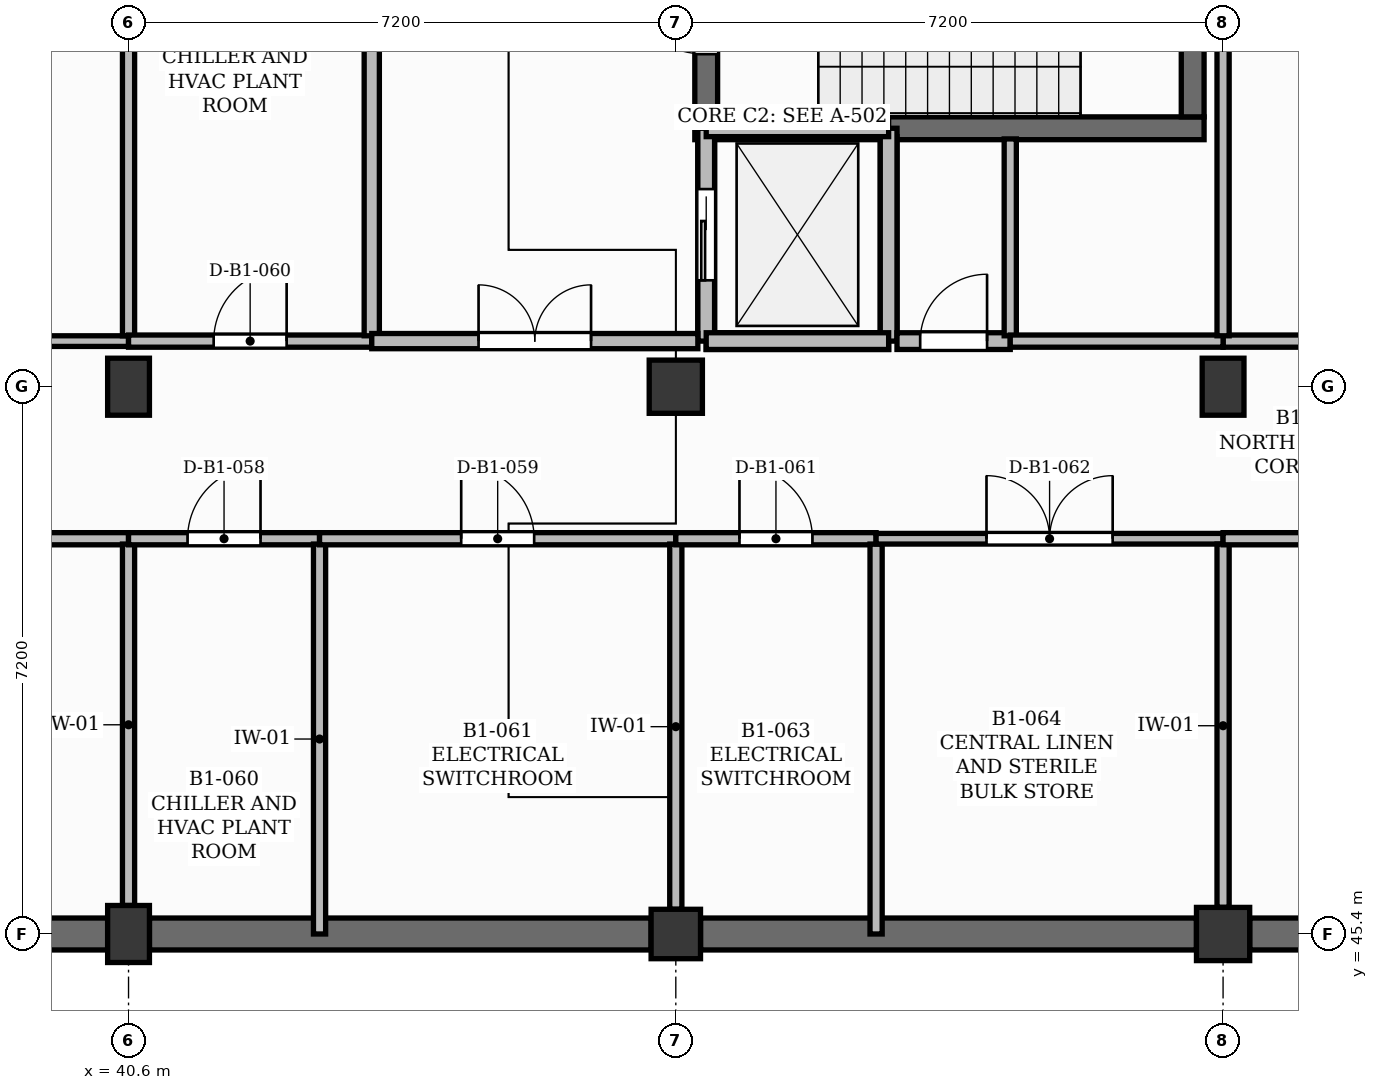
"""IFC4 building model, lengths in metres.
Left out: names, types, materials, properties, quantities, classifications, styles, units other than length and angle.
Written with IfcOpenShell. Run it as: python <this file> out.ifc"""

import sys

from ifc_helpers import new_model, si_unit, direction, frame, frame_2d, origin, origin_2d, place, context, subcontext, project, spatial, rectangle, extrude, element, fill, save


model = new_model("IFC4")
c1 = context("Model", 3, precision=1e-05, world=origin(), true_north=direction((0.0, 1.0)))
c2 = subcontext(c1, "Body", "Model", "MODEL_VIEW")
j1 = project(units=[si_unit("LENGTHUNIT", "METRE"), si_unit("PLANEANGLEUNIT", "RADIAN")], contexts=[c1])
p1 = place(None, origin())
s1 = spatial("IfcSite", under=j1, at=p1, CompositionType="ELEMENT")
p2 = place(p1, origin())
s2 = spatial("IfcBuilding", under=s1, at=p2, CompositionType="ELEMENT")
p3 = place(p2, frame((0.0, 0.0, -4.5)))
s3 = spatial("IfcBuildingStorey", under=s2, at=p3, CompositionType="ELEMENT", Elevation=-4.5)
for number, where, z_axis, x_axis in (
    (1, (40.6, 45.4, 0.0), (0.0, 0.0, 1.0), (1.0, 0.0, 0.0)),
    (2, (40.6, 52.6, 0.0), (0.0, 0.0, 1.0), (1.0, 0.0, 0.0)),
):
    element("IfcColumn", number, at=place(p3, frame(where, z_axis=z_axis, x_axis=x_axis)), inside=s3, PredefinedType="COLUMN", context=c2, shape_type="SweptSolid", body=[
        extrude(rectangle(XDim=0.55, YDim=0.75, at=origin_2d()), origin(), (0.0, 0.0, 1.0), 4.2),
    ])
p4 = place(p3, frame((47.8, 45.4, 0.0), z_axis=(0.0, 0.0, 1.0), x_axis=(1.0, 0.0, 0.0)))
e3 = element("IfcColumn", 3, at=p4, inside=s3, PredefinedType="COLUMN", context=c2, shape_type="SweptSolid", body=[
    extrude(rectangle(XDim=0.65, YDim=0.65, at=origin_2d()), origin(), (0.0, 0.0, 1.0), 4.2),
])
for number, where, z_axis, x_axis in (
    (4, (47.8, 52.6, 0.0), (0.0, 0.0, 1.0), (1.0, 0.0, 0.0)),
    (5, (55.0, 45.4, 0.0), (0.0, 0.0, 1.0), (1.0, 0.0, 0.0)),
):
    element("IfcColumn", number, at=place(p3, frame(where, z_axis=z_axis, x_axis=x_axis)), inside=s3, PredefinedType="COLUMN", context=c2, shape_type="SweptSolid", body=[
        extrude(rectangle(XDim=0.7, YDim=0.7, at=origin_2d()), origin(), (0.0, 0.0, 1.0), 4.2),
    ])
p5 = place(p3, frame((55.0, 52.6, 0.0), z_axis=(0.0, 0.0, 1.0), x_axis=(1.0, 0.0, 0.0)))
e6 = element("IfcColumn", 6, at=p5, inside=s3, PredefinedType="COLUMN", context=c2, shape_type="SweptSolid", body=[
    extrude(rectangle(XDim=0.55, YDim=0.75, at=origin_2d()), origin(), (0.0, 0.0, 1.0), 4.2),
])
p6 = place(p3, frame((33.75, 45.4, 0.0), z_axis=(0.0, 0.0, 1.0), x_axis=(1.0, 0.0, 0.0)))
e7 = element("IfcWall", 7, at=p6, inside=s3, PredefinedType="USERDEFINED", context=c2, shape_type="SweptSolid", body=[
    extrude(rectangle(XDim=6.575, YDim=0.42, at=frame_2d((3.288, 0.0))), origin(), (0.0, 0.0, 1.0), 4.2),
])
p7 = place(p3, frame((40.875, 45.4, 0.0), z_axis=(0.0, 0.0, 1.0), x_axis=(1.0, 0.0, 0.0)))
e8 = element("IfcWall", 8, at=p7, inside=s3, PredefinedType="USERDEFINED", context=c2, shape_type="SweptSolid", body=[
    extrude(rectangle(XDim=6.6, YDim=0.42, at=frame_2d((3.3, 0.0))), origin(), (0.0, 0.0, 1.0), 4.2),
])
for number, where, z_axis, x_axis in (
    (9, (48.125, 45.4, 0.0), (0.0, 0.0, 1.0), (1.0, 0.0, 0.0)),
    (10, (55.35, 45.4, 0.0), (0.0, 0.0, 1.0), (1.0, 0.0, 0.0)),
):
    element("IfcWall", number, at=place(p3, frame(where, z_axis=z_axis, x_axis=x_axis)), inside=s3, PredefinedType="USERDEFINED", context=c2, shape_type="SweptSolid", body=[
        extrude(rectangle(XDim=6.525, YDim=0.42, at=frame_2d((3.262, 0.0))), origin(), (0.0, 0.0, 1.0), 4.2),
    ])
p8 = place(p3, frame((48.05, 56.0, 0.0), z_axis=(0.0, 0.0, 1.0), x_axis=(1.0, 0.0, 0.0)))
e11 = element("IfcWall", 11, at=p8, inside=s3, PredefinedType="SHEAR", context=c2, shape_type="SweptSolid", body=[
    extrude(rectangle(XDim=6.7, YDim=0.3, at=frame_2d((3.35, 0.0))), origin(), (0.0, 0.0, 1.0), 4.25),
])
p9 = place(p3, frame((48.2, 56.15, 0.0), z_axis=(0.0, 0.0, 1.0), x_axis=(0.0, 1.0, 0.0)))
e12 = element("IfcWall", 12, at=p9, inside=s3, PredefinedType="SHEAR", context=c2, shape_type="SweptSolid", body=[
    extrude(rectangle(XDim=2.9, YDim=0.3, at=frame_2d((1.45, 0.0))), origin(), (0.0, 0.0, 1.0), 4.25),
])
p10 = place(p9, frame((0.825, 0.0, 0.0)))
e13 = element("IfcOpeningElement", 13, at=p10, cuts=e12, PredefinedType="OPENING", context=c2, shape_type="SweptSolid", body=[
    extrude(rectangle(XDim=1.25, YDim=2.15, at=frame_2d((0.625, 1.075))), frame((0.0, 0.16, 0.0), z_axis=(0.0, -1.0, 0.0), x_axis=(1.0, 0.0, 0.0)), (0.0, 0.0, 1.0), 0.32),
])
p11 = place(p3, frame((54.6, 56.15, 0.0), z_axis=(0.0, 0.0, 1.0), x_axis=(0.0, 1.0, 0.0)))
e14 = element("IfcWall", 14, at=p11, inside=s3, PredefinedType="SHEAR", context=c2, shape_type="SweptSolid", body=[
    extrude(rectangle(XDim=2.9, YDim=0.3, at=frame_2d((1.45, 0.0))), origin(), (0.0, 0.0, 1.0), 4.25),
])
p12 = place(p3, frame((48.2, 53.2, 0.0), z_axis=(0.0, 0.0, 1.0), x_axis=(1.0, 0.0, 0.0)))
e15 = element("IfcWall", 15, at=p12, inside=s3, PredefinedType="SOLIDWALL", context=c2, shape_type="SweptSolid", body=[
    extrude(rectangle(XDim=2.4, YDim=0.22, at=frame_2d((1.2, 0.0))), origin(), (0.0, 0.0, 1.0), 4.25),
])
p13 = place(p3, frame((48.2, 53.31, 0.0), z_axis=(0.0, 0.0, 1.0), x_axis=(0.0, 1.0, 0.0)))
e16 = element("IfcWall", 16, at=p13, inside=s3, PredefinedType="SOLIDWALL", context=c2, shape_type="SweptSolid", body=[
    extrude(rectangle(XDim=2.58, YDim=0.22, at=frame_2d((1.29, 0.0))), origin(), (0.0, 0.0, 1.0), 4.25),
])
p14 = place(p13, frame((0.69, 0.0, 0.0)))
e17 = element("IfcOpeningElement", 17, at=p14, cuts=e16, PredefinedType="OPENING", context=c2, shape_type="SweptSolid", body=[
    extrude(rectangle(XDim=1.2, YDim=2.15, at=frame_2d((0.6, 1.075))), frame((0.0, 0.12, 0.0), z_axis=(0.0, -1.0, 0.0), x_axis=(1.0, 0.0, 0.0)), (0.0, 0.0, 1.0), 0.24),
])
p15 = place(p3, frame((50.6, 53.31, 0.0), z_axis=(0.0, 0.0, 1.0), x_axis=(0.0, 1.0, 0.0)))
e18 = element("IfcWall", 18, at=p15, inside=s3, PredefinedType="SOLIDWALL", context=c2, shape_type="SweptSolid", body=[
    extrude(rectangle(XDim=2.58, YDim=0.22, at=frame_2d((1.29, 0.0))), origin(), (0.0, 0.0, 1.0), 4.25),
])
for number, where, z_axis, x_axis in (
    (19, (48.2, 53.2, -0.9), (0.0, 0.0, 1.0), (0.0, 1.0, 0.0)),
    (20, (50.6, 53.2, -0.9), (0.0, 0.0, 1.0), (0.0, 1.0, 0.0)),
):
    element("IfcWall", number, at=place(p3, frame(where, z_axis=z_axis, x_axis=x_axis)), inside=s3, PredefinedType="SOLIDWALL", context=c2, shape_type="SweptSolid", body=[
        extrude(rectangle(XDim=2.8, YDim=0.22, at=frame_2d((1.4, 0.0))), origin(), (0.0, 0.0, 1.0), 0.9),
    ])
for number, where, z_axis, x_axis in (
    (21, (48.2, 53.2, -0.9), (0.0, 0.0, 1.0), (1.0, 0.0, 0.0)),
    (22, (48.2, 56.0, -0.9), (0.0, 0.0, 1.0), (1.0, 0.0, 0.0)),
):
    element("IfcWall", number, at=place(p3, frame(where, z_axis=z_axis, x_axis=x_axis)), inside=s3, PredefinedType="SOLIDWALL", context=c2, shape_type="SweptSolid", body=[
        extrude(rectangle(XDim=2.4, YDim=0.22, at=frame_2d((1.2, 0.0))), origin(), (0.0, 0.0, 1.0), 0.9),
    ])
p16 = place(p3, frame((33.4, 50.6, 0.0), z_axis=(0.0, 0.0, 1.0), x_axis=(1.0, 0.0, 0.0)))
e23 = element("IfcWall", 23, at=p16, inside=s3, PredefinedType="PARTITIONING", context=c2, shape_type="SweptSolid", body=[
    extrude(rectangle(XDim=7.2, YDim=0.16, at=frame_2d((3.6, 0.0))), origin(), (0.0, 0.0, 1.0), 4.08),
])
p17 = place(p16, frame((3.12, 0.0, 0.0)))
e24 = element("IfcOpeningElement", 24, at=p17, cuts=e23, PredefinedType="OPENING", context=c2, shape_type="SweptSolid", body=[
    extrude(rectangle(XDim=0.96, YDim=2.1, at=frame_2d((0.48, 1.05))), frame((0.0, 0.09, 0.0), z_axis=(0.0, -1.0, 0.0), x_axis=(1.0, 0.0, 0.0)), (0.0, 0.0, 1.0), 0.18),
])
p18 = place(p3, frame((35.913, 53.2, 0.0), z_axis=(0.0, 0.0, 1.0), x_axis=(1.0, 0.0, 0.0)))
e25 = element("IfcWall", 25, at=p18, inside=s3, PredefinedType="PARTITIONING", context=c2, shape_type="SweptSolid", body=[
    extrude(rectangle(XDim=4.687, YDim=0.14, at=frame_2d((2.344, 0.0))), origin(), (0.0, 0.0, 1.0), 4.08),
])
p19 = place(p18, frame((1.513, 0.0, 0.0)))
e26 = element("IfcOpeningElement", 26, at=p19, cuts=e25, PredefinedType="OPENING", context=c2, shape_type="SweptSolid", body=[
    extrude(rectangle(XDim=1.66, YDim=2.3, at=frame_2d((0.83, 1.15))), frame((0.0, 0.08, 0.0), z_axis=(0.0, -1.0, 0.0), x_axis=(1.0, 0.0, 0.0)), (0.0, 0.0, 1.0), 0.16),
])
p20 = place(p3, frame((40.6, 45.775, 0.0), z_axis=(0.0, 0.0, 1.0), x_axis=(0.0, 1.0, 0.0)))
e27 = element("IfcWall", 27, at=p20, inside=s3, PredefinedType="PARTITIONING", context=c2, shape_type="SweptSolid", body=[
    extrude(rectangle(XDim=4.755, YDim=0.16, at=frame_2d((2.377, 0.0))), origin(), (0.0, 0.0, 1.0), 3.5),
])
p21 = place(p3, frame((40.6, 50.6, 0.0), z_axis=(0.0, 0.0, 1.0), x_axis=(1.0, 0.0, 0.0)))
e28 = element("IfcWall", 28, at=p21, inside=s3, PredefinedType="PARTITIONING", context=c2, shape_type="SweptSolid", body=[
    extrude(rectangle(XDim=2.513, YDim=0.16, at=frame_2d((1.256, 0.0))), origin(), (0.0, 0.0, 1.0), 4.08),
])
p22 = place(p21, frame((0.777, 0.0, 0.0)))
e29 = element("IfcOpeningElement", 29, at=p22, cuts=e28, PredefinedType="OPENING", context=c2, shape_type="SweptSolid", body=[
    extrude(rectangle(XDim=0.96, YDim=2.1, at=frame_2d((0.48, 1.05))), frame((0.0, 0.09, 0.0), z_axis=(0.0, -1.0, 0.0), x_axis=(1.0, 0.0, 0.0)), (0.0, 0.0, 1.0), 0.18),
])
p23 = place(p3, frame((40.6, 53.27, 0.0), z_axis=(0.0, 0.0, 1.0), x_axis=(0.0, 1.0, 0.0)))
e30 = element("IfcWall", 30, at=p23, inside=s3, PredefinedType="PARTITIONING", context=c2, shape_type="SweptSolid", body=[
    extrude(rectangle(XDim=6.18, YDim=0.16, at=frame_2d((3.09, 0.0))), origin(), (0.0, 0.0, 1.0), 3.5),
])
p24 = place(p3, frame((40.6, 53.2, 0.0), z_axis=(0.0, 0.0, 1.0), x_axis=(1.0, 0.0, 0.0)))
e31 = element("IfcWall", 31, at=p24, inside=s3, PredefinedType="PARTITIONING", context=c2, shape_type="SweptSolid", body=[
    extrude(rectangle(XDim=3.2, YDim=0.16, at=frame_2d((1.6, 0.0))), origin(), (0.0, 0.0, 1.0), 4.08),
])
p25 = place(p24, frame((1.12, 0.0, 0.0)))
e32 = element("IfcOpeningElement", 32, at=p25, cuts=e31, PredefinedType="OPENING", context=c2, shape_type="SweptSolid", body=[
    extrude(rectangle(XDim=0.96, YDim=2.1, at=frame_2d((0.48, 1.05))), frame((0.0, 0.09, 0.0), z_axis=(0.0, -1.0, 0.0), x_axis=(1.0, 0.0, 0.0)), (0.0, 0.0, 1.0), 0.18),
])
p26 = place(p3, frame((43.113, 45.4, 0.0), z_axis=(0.0, 0.0, 1.0), x_axis=(0.0, 1.0, 0.0)))
e33 = element("IfcWall", 33, at=p26, inside=s3, PredefinedType="PARTITIONING", context=c2, shape_type="SweptSolid", body=[
    extrude(rectangle(XDim=5.13, YDim=0.16, at=frame_2d((2.565, 0.0))), origin(), (0.0, 0.0, 1.0), 4.08),
])
p27 = place(p3, frame((43.113, 50.6, 0.0), z_axis=(0.0, 0.0, 1.0), x_axis=(1.0, 0.0, 0.0)))
e34 = element("IfcWall", 34, at=p27, inside=s3, PredefinedType="PARTITIONING", context=c2, shape_type="SweptSolid", body=[
    extrude(rectangle(XDim=4.687, YDim=0.16, at=frame_2d((2.344, 0.0))), origin(), (0.0, 0.0, 1.0), 4.08),
])
p28 = place(p27, frame((1.864, 0.0, 0.0)))
e35 = element("IfcOpeningElement", 35, at=p28, cuts=e34, PredefinedType="OPENING", context=c2, shape_type="SweptSolid", body=[
    extrude(rectangle(XDim=0.96, YDim=2.1, at=frame_2d((0.48, 1.05))), frame((0.0, 0.09, 0.0), z_axis=(0.0, -1.0, 0.0), x_axis=(1.0, 0.0, 0.0)), (0.0, 0.0, 1.0), 0.18),
])
p29 = place(p3, frame((43.8, 53.27, 0.0), z_axis=(0.0, 0.0, 1.0), x_axis=(0.0, 1.0, 0.0)))
e36 = element("IfcWall", 36, at=p29, inside=s3, PredefinedType="PARTITIONING", context=c2, shape_type="SweptSolid", body=[
    extrude(rectangle(XDim=5.33, YDim=0.2, at=frame_2d((2.665, 0.0))), origin(), (0.0, 0.0, 1.0), 4.08),
])
p30 = place(p3, frame((43.8, 53.2, 0.0), z_axis=(0.0, 0.0, 1.0), x_axis=(1.0, 0.0, 0.0)))
e37 = element("IfcWall", 37, at=p30, inside=s3, PredefinedType="PARTITIONING", context=c2, shape_type="SweptSolid", body=[
    extrude(rectangle(XDim=4.29, YDim=0.2, at=frame_2d((2.145, 0.0))), origin(), (0.0, 0.0, 1.0), 4.08),
])
p31 = place(p30, frame((1.405, 0.0, 0.0)))
e38 = element("IfcOpeningElement", 38, at=p31, cuts=e37, PredefinedType="OPENING", context=c2, shape_type="SweptSolid", body=[
    extrude(rectangle(XDim=1.48, YDim=2.25, at=frame_2d((0.74, 1.125))), frame((0.0, 0.11, 0.0), z_axis=(0.0, -1.0, 0.0), x_axis=(1.0, 0.0, 0.0)), (0.0, 0.0, 1.0), 0.22),
])
p32 = place(p3, frame((47.8, 45.725, 0.0), z_axis=(0.0, 0.0, 1.0), x_axis=(0.0, 1.0, 0.0)))
e39 = element("IfcWall", 39, at=p32, inside=s3, PredefinedType="PARTITIONING", context=c2, shape_type="SweptSolid", body=[
    extrude(rectangle(XDim=4.805, YDim=0.16, at=frame_2d((2.402, 0.0))), origin(), (0.0, 0.0, 1.0), 3.5),
])
p33 = place(p3, frame((47.8, 50.6, 0.0), z_axis=(0.0, 0.0, 1.0), x_axis=(1.0, 0.0, 0.0)))
e40 = element("IfcWall", 40, at=p33, inside=s3, PredefinedType="PARTITIONING", context=c2, shape_type="SweptSolid", body=[
    extrude(rectangle(XDim=2.635, YDim=0.16, at=frame_2d((1.317, 0.0))), origin(), (0.0, 0.0, 1.0), 4.08),
])
p34 = place(p33, frame((0.837, 0.0, 0.0)))
e41 = element("IfcOpeningElement", 41, at=p34, cuts=e40, PredefinedType="OPENING", context=c2, shape_type="SweptSolid", body=[
    extrude(rectangle(XDim=0.96, YDim=2.1, at=frame_2d((0.48, 1.05))), frame((0.0, 0.09, 0.0), z_axis=(0.0, -1.0, 0.0), x_axis=(1.0, 0.0, 0.0)), (0.0, 0.0, 1.0), 0.18),
])
p35 = place(p3, frame((50.435, 45.4, 0.0), z_axis=(0.0, 0.0, 1.0), x_axis=(0.0, 1.0, 0.0)))
e42 = element("IfcWall", 42, at=p35, inside=s3, PredefinedType="PARTITIONING", context=c2, shape_type="SweptSolid", body=[
    extrude(rectangle(XDim=5.13, YDim=0.16, at=frame_2d((2.565, 0.0))), origin(), (0.0, 0.0, 1.0), 4.08),
])
p36 = place(p3, frame((50.435, 50.6, 0.0), z_axis=(0.0, 0.0, 1.0), x_axis=(1.0, 0.0, 0.0)))
e43 = element("IfcWall", 43, at=p36, inside=s3, PredefinedType="PARTITIONING", context=c2, shape_type="SweptSolid", body=[
    extrude(rectangle(XDim=4.565, YDim=0.14, at=frame_2d((2.282, 0.0))), origin(), (0.0, 0.0, 1.0), 4.08),
])
p37 = place(p36, frame((1.452, 0.0, 0.0)))
e44 = element("IfcOpeningElement", 44, at=p37, cuts=e43, PredefinedType="OPENING", context=c2, shape_type="SweptSolid", body=[
    extrude(rectangle(XDim=1.66, YDim=2.3, at=frame_2d((0.83, 1.15))), frame((0.0, 0.08, 0.0), z_axis=(0.0, -1.0, 0.0), x_axis=(1.0, 0.0, 0.0)), (0.0, 0.0, 1.0), 0.16),
])
p38 = place(p3, frame((50.71, 53.2, 0.0), z_axis=(0.0, 0.0, 1.0), x_axis=(1.0, 0.0, 0.0)))
e45 = element("IfcWall", 45, at=p38, inside=s3, PredefinedType="SOLIDWALL", context=c2, shape_type="SweptSolid", body=[
    extrude(rectangle(XDim=1.49, YDim=0.22, at=frame_2d((0.745, 0.0))), origin(), (0.0, 0.0, 1.0), 4.08),
])
p39 = place(p38, frame((0.305, 0.0, 0.0)))
e46 = element("IfcOpeningElement", 46, at=p39, cuts=e45, PredefinedType="OPENING", context=c2, shape_type="SweptSolid", body=[
    extrude(rectangle(XDim=0.88, YDim=2.05, at=frame_2d((0.44, 1.025))), frame((0.0, 0.12, 0.0), z_axis=(0.0, -1.0, 0.0), x_axis=(1.0, 0.0, 0.0)), (0.0, 0.0, 1.0), 0.24),
])
p40 = place(p3, frame((55.0, 45.75, 0.0), z_axis=(0.0, 0.0, 1.0), x_axis=(0.0, 1.0, 0.0)))
e47 = element("IfcWall", 47, at=p40, inside=s3, PredefinedType="PARTITIONING", context=c2, shape_type="SweptSolid", body=[
    extrude(rectangle(XDim=4.78, YDim=0.16, at=frame_2d((2.39, 0.0))), origin(), (0.0, 0.0, 1.0), 3.5),
])
p41 = place(p3, frame((55.0, 50.6, 0.0), z_axis=(0.0, 0.0, 1.0), x_axis=(1.0, 0.0, 0.0)))
e48 = element("IfcWall", 48, at=p41, inside=s3, PredefinedType="PARTITIONING", context=c2, shape_type="SweptSolid", body=[
    extrude(rectangle(XDim=7.05, YDim=0.16, at=frame_2d((3.525, 0.0))), origin(), (0.0, 0.0, 1.0), 4.08),
])
p42 = place(p41, frame((3.045, 0.0, 0.0)))
e49 = element("IfcOpeningElement", 49, at=p42, cuts=e48, PredefinedType="OPENING", context=c2, shape_type="SweptSolid", body=[
    extrude(rectangle(XDim=0.96, YDim=2.1, at=frame_2d((0.48, 1.05))), frame((0.0, 0.09, 0.0), z_axis=(0.0, -1.0, 0.0), x_axis=(1.0, 0.0, 0.0)), (0.0, 0.0, 1.0), 0.18),
])
p43 = place(p3, frame((55.0, 53.2, 0.0), z_axis=(0.0, 0.0, 1.0), x_axis=(1.0, 0.0, 0.0)))
e50 = element("IfcWall", 50, at=p43, inside=s3, PredefinedType="PARTITIONING", context=c2, shape_type="SweptSolid", body=[
    extrude(rectangle(XDim=7.2, YDim=0.16, at=frame_2d((3.6, 0.0))), origin(), (0.0, 0.0, 1.0), 4.08),
])
p44 = place(p43, frame((3.12, 0.0, 0.0)))
e51 = element("IfcOpeningElement", 51, at=p44, cuts=e50, PredefinedType="OPENING", context=c2, shape_type="SweptSolid", body=[
    extrude(rectangle(XDim=0.96, YDim=2.1, at=frame_2d((0.48, 1.05))), frame((0.0, 0.09, 0.0), z_axis=(0.0, -1.0, 0.0), x_axis=(1.0, 0.0, 0.0)), (0.0, 0.0, 1.0), 0.18),
])
p45 = place(p3, frame((52.2, 53.27, 0.0), z_axis=(0.0, 0.0, 1.0), x_axis=(0.0, 1.0, 0.0)))
e52 = element("IfcWall", 52, at=p45, inside=s3, PredefinedType="PARTITIONING", context=c2, shape_type="SweptSolid", body=[
    extrude(rectangle(XDim=2.59, YDim=0.16, at=frame_2d((1.295, 0.0))), origin(), (0.0, 0.0, 1.0), 4.08),
])
p46 = place(p3, frame((55.0, 53.2, 0.0), z_axis=(0.0, 0.0, 1.0), x_axis=(-1.0, 0.0, 0.0)))
e53 = element("IfcWall", 53, at=p46, inside=s3, PredefinedType="PARTITIONING", context=c2, shape_type="SweptSolid", body=[
    extrude(rectangle(XDim=2.8, YDim=0.16, at=frame_2d((1.4, 0.0))), origin(), (0.0, 0.0, 1.0), 4.08),
])
p47 = place(p3, frame((55.0, 53.27, 0.0), z_axis=(0.0, 0.0, 1.0), x_axis=(0.0, 1.0, 0.0)))
e54 = element("IfcWall", 54, at=p47, inside=s3, PredefinedType="PARTITIONING", context=c2, shape_type="SweptSolid", body=[
    extrude(rectangle(XDim=6.155, YDim=0.16, at=frame_2d((3.078, 0.0))), origin(), (0.0, 0.0, 1.0), 3.5),
])
p48 = place(p14, origin())
e55 = element("IfcDoor", 55, at=p48, inside=s3, OperationType="SLIDING_TO_LEFT", PredefinedType="DOOR", context=c2, shape_type="SweptSolid", body=[
    extrude(rectangle(XDim=1.2, YDim=2.15, at=frame_2d((0.6, 1.075))), frame((0.0, 0.025, 0.0), z_axis=(0.0, -1.0, 0.0), x_axis=(1.0, 0.0, 0.0)), (0.0, 0.0, 1.0), 0.05),
])
fill(e17, e55)
p49 = place(p10, origin())
e56 = element("IfcDoor", 56, at=p49, inside=s3, OperationType="SINGLE_SWING_RIGHT", PredefinedType="DOOR", context=c2, shape_type="SweptSolid", body=[
    extrude(rectangle(XDim=1.25, YDim=2.15, at=frame_2d((0.625, 1.075))), frame((0.0, 0.025, 0.0), z_axis=(0.0, -1.0, 0.0), x_axis=(1.0, 0.0, 0.0)), (0.0, 0.0, 1.0), 0.05),
])
fill(e13, e56)
p50 = place(p31, origin())
e57 = element("IfcDoor", 57, at=p50, inside=s3, OperationType="DOUBLE_DOOR_SINGLE_SWING", PredefinedType="DOOR", context=c2, shape_type="SweptSolid", body=[
    extrude(rectangle(XDim=1.48, YDim=2.25, at=frame_2d((0.74, 1.125))), frame((0.0, 0.025, 0.0), z_axis=(0.0, -1.0, 0.0), x_axis=(1.0, 0.0, 0.0)), (0.0, 0.0, 1.0), 0.05),
])
fill(e38, e57)
p51 = place(p39, origin())
e58 = element("IfcDoor", 58, at=p51, inside=s3, OperationType="SINGLE_SWING_RIGHT", PredefinedType="DOOR", context=c2, shape_type="SweptSolid", body=[
    extrude(rectangle(XDim=0.88, YDim=2.05, at=frame_2d((0.44, 1.025))), frame((0.0, 0.025, 0.0), z_axis=(0.0, -1.0, 0.0), x_axis=(1.0, 0.0, 0.0)), (0.0, 0.0, 1.0), 0.05),
])
fill(e46, e58)
p52 = place(p22, origin())
e59 = element("IfcDoor", 59, at=p52, inside=s3, OperationType="SINGLE_SWING_RIGHT", PredefinedType="DOOR", context=c2, shape_type="SweptSolid", body=[
    extrude(rectangle(XDim=0.96, YDim=2.1, at=frame_2d((0.48, 1.05))), frame((0.0, 0.025, 0.0), z_axis=(0.0, -1.0, 0.0), x_axis=(1.0, 0.0, 0.0)), (0.0, 0.0, 1.0), 0.05),
])
fill(e29, e59)
p53 = place(p28, origin())
e60 = element("IfcDoor", 60, at=p53, inside=s3, OperationType="SINGLE_SWING_LEFT", PredefinedType="DOOR", context=c2, shape_type="SweptSolid", body=[
    extrude(rectangle(XDim=0.96, YDim=2.1, at=frame_2d((0.48, 1.05))), frame((0.0, 0.025, 0.0), z_axis=(0.0, -1.0, 0.0), x_axis=(1.0, 0.0, 0.0)), (0.0, 0.0, 1.0), 0.05),
])
fill(e35, e60)
p54 = place(p25, origin())
e61 = element("IfcDoor", 61, at=p54, inside=s3, OperationType="SINGLE_SWING_RIGHT", PredefinedType="DOOR", context=c2, shape_type="SweptSolid", body=[
    extrude(rectangle(XDim=0.96, YDim=2.1, at=frame_2d((0.48, 1.05))), frame((0.0, 0.025, 0.0), z_axis=(0.0, -1.0, 0.0), x_axis=(1.0, 0.0, 0.0)), (0.0, 0.0, 1.0), 0.05),
])
fill(e32, e61)
p55 = place(p34, origin())
e62 = element("IfcDoor", 62, at=p55, inside=s3, OperationType="SINGLE_SWING_LEFT", PredefinedType="DOOR", context=c2, shape_type="SweptSolid", body=[
    extrude(rectangle(XDim=0.96, YDim=2.1, at=frame_2d((0.48, 1.05))), frame((0.0, 0.025, 0.0), z_axis=(0.0, -1.0, 0.0), x_axis=(1.0, 0.0, 0.0)), (0.0, 0.0, 1.0), 0.05),
])
fill(e41, e62)
p56 = place(p37, origin())
e63 = element("IfcDoor", 63, at=p56, inside=s3, OperationType="DOUBLE_DOOR_SINGLE_SWING", PredefinedType="DOOR", context=c2, shape_type="SweptSolid", body=[
    extrude(rectangle(XDim=1.66, YDim=2.3, at=frame_2d((0.83, 1.15))), frame((0.0, 0.025, 0.0), z_axis=(0.0, -1.0, 0.0), x_axis=(1.0, 0.0, 0.0)), (0.0, 0.0, 1.0), 0.05),
])
fill(e44, e63)
save(model, sys.argv[1])
